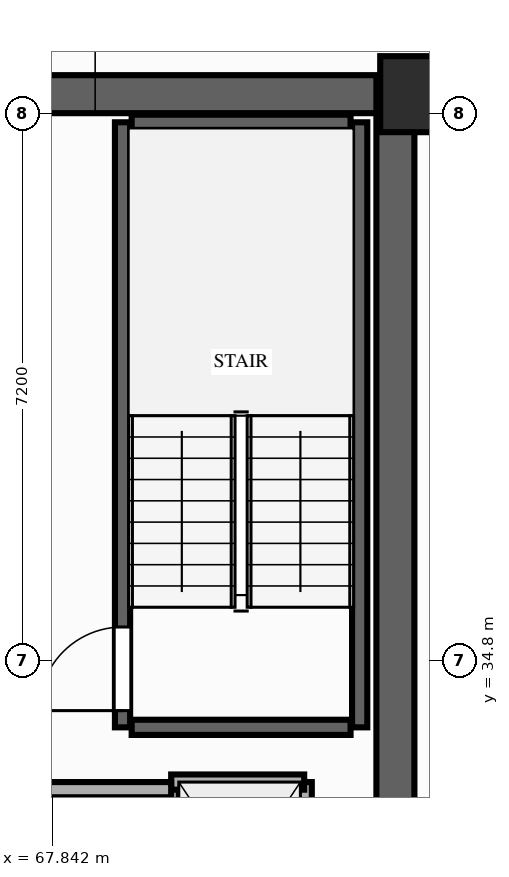
"""IFC4 building model, lengths in metres.
Left out: names, types, materials, properties, quantities, classifications, styles, units other than length and angle.
Written with IfcOpenShell. Run it as: python <this file> out.ifc"""

import sys

from ifc_helpers import new_model, si_unit, direction, frame, frame_2d, origin, origin_2d, place, context, subcontext, project, spatial, rectangle, extrude, element, fill, save


model = new_model("IFC4")
c1 = context("Model", 3, precision=1e-05, world=origin(), true_north=direction((0.0, 1.0)))
c2 = subcontext(c1, "Body", "Model", "MODEL_VIEW")
j1 = project(units=[si_unit("LENGTHUNIT", "METRE"), si_unit("PLANEANGLEUNIT", "RADIAN")], contexts=[c1])
p1 = place(None, origin())
s1 = spatial("IfcSite", under=j1, at=p1, CompositionType="ELEMENT")
p2 = place(p1, origin())
s2 = spatial("IfcBuilding", under=s1, at=p2, CompositionType="ELEMENT")
p3 = place(p2, frame((0.0, 0.0, 33.4)))
s3 = spatial("IfcBuildingStorey", under=s2, at=p3, CompositionType="ELEMENT", Elevation=33.4)
p4 = place(p3, frame((72.65, 42.25, 0.0), z_axis=(0.0, 0.0, 1.0), x_axis=(1.0, 0.0, 0.0)))
e1 = element("IfcColumn", 1, at=p4, inside=s3, PredefinedType="COLUMN", context=c2, shape_type="SweptSolid", body=[
    extrude(rectangle(XDim=1.0, YDim=1.0, at=origin_2d()), origin(), (0.0, 0.0, 1.0), 3.2),
])
p5 = place(p3, frame((72.35, 22.0, 0.0), z_axis=(0.0, 0.0, 1.0), x_axis=(0.0, 1.0, 0.0)))
e2 = element("IfcWall", 2, at=p5, inside=s3, PredefinedType="SHEAR", context=c2, shape_type="SweptSolid", body=[
    extrude(rectangle(XDim=20.25, YDim=0.5, at=frame_2d((10.125, 0.0))), origin(), (0.0, 0.0, 1.0), 3.02),
])
p6 = place(p3, frame((64.6, 42.25, 0.0), z_axis=(0.0, 0.0, 1.0), x_axis=(1.0, 0.0, 0.0)))
e3 = element("IfcWall", 3, at=p6, inside=s3, PredefinedType="SHEAR", context=c2, shape_type="SweptSolid", body=[
    extrude(rectangle(XDim=7.5, YDim=0.5, at=frame_2d((3.75, 0.0))), origin(), (0.0, 0.0, 1.0), 3.02),
])
p7 = place(p3, frame((68.76, 33.92, 0.0), z_axis=(0.0, 0.0, 1.0), x_axis=(0.0, 1.0, 0.0)))
e4 = element("IfcWall", 4, at=p7, inside=s3, PredefinedType="SHEAR", context=c2, shape_type="SweptSolid", body=[
    extrude(rectangle(XDim=7.96, YDim=0.2, at=frame_2d((3.98, 0.0))), origin(), (0.0, 0.0, 1.0), 3.02),
])
p8 = place(p7, frame((0.22, 0.0, 0.0)))
e5 = element("IfcOpeningElement", 5, at=p8, cuts=e4, PredefinedType="OPENING", context=c2, shape_type="SweptSolid", body=[
    extrude(rectangle(XDim=1.1, YDim=2.15, at=frame_2d((0.55, 1.075))), frame((0.0, 0.11, 0.0), z_axis=(0.0, -1.0, 0.0), x_axis=(1.0, 0.0, 0.0)), (0.0, 0.0, 1.0), 0.22),
])
p9 = place(p3, frame((71.88, 33.92, 0.0), z_axis=(0.0, 0.0, 1.0), x_axis=(0.0, 1.0, 0.0)))
e6 = element("IfcWall", 6, at=p9, inside=s3, PredefinedType="SHEAR", context=c2, shape_type="SweptSolid", body=[
    extrude(rectangle(XDim=7.96, YDim=0.2, at=frame_2d((3.98, 0.0))), origin(), (0.0, 0.0, 1.0), 3.02),
])
for number, where, z_axis, x_axis in (
    (7, (68.88, 41.88, 0.0), (0.0, 0.0, 1.0), (1.0, 0.0, 0.0)),
    (8, (68.88, 33.92, 0.0), (0.0, 0.0, 1.0), (1.0, 0.0, 0.0)),
):
    element("IfcWall", number, at=place(p3, frame(where, z_axis=z_axis, x_axis=x_axis)), inside=s3, PredefinedType="SHEAR", context=c2, shape_type="SweptSolid", body=[
        extrude(rectangle(XDim=2.88, YDim=0.2, at=frame_2d((1.44, 0.0))), origin(), (0.0, 0.0, 1.0), 3.02),
    ])
p10 = place(p3, frame((69.4, 30.75, 0.0), z_axis=(0.0, 0.0, 1.0), x_axis=(0.0, 1.0, 0.0)))
e9 = element("IfcWall", 9, at=p10, inside=s3, PredefinedType="MOVABLE", context=c2, shape_type="SweptSolid", body=[
    extrude(rectangle(XDim=2.45, YDim=0.2, at=frame_2d((1.225, 0.0))), origin(), (0.0, 0.0, 1.0), 3.02),
])
p11 = place(p10, frame((0.65, 0.0, 0.0)))
e10 = element("IfcOpeningElement", 10, at=p11, cuts=e9, PredefinedType="OPENING", context=c2, shape_type="SweptSolid", body=[
    extrude(rectangle(XDim=1.05, YDim=2.15, at=frame_2d((0.525, 1.075))), frame((0.0, 0.11, 0.0), z_axis=(0.0, -1.0, 0.0), x_axis=(1.0, 0.0, 0.0)), (0.0, 0.0, 1.0), 0.22),
])
p12 = place(p3, frame((71.15, 30.75, 0.0), z_axis=(0.0, 0.0, 1.0), x_axis=(0.0, 1.0, 0.0)))
e11 = element("IfcWall", 11, at=p12, inside=s3, PredefinedType="MOVABLE", context=c2, shape_type="SweptSolid", body=[
    extrude(rectangle(XDim=2.45, YDim=0.2, at=frame_2d((1.225, 0.0))), origin(), (0.0, 0.0, 1.0), 3.02),
])
p13 = place(p3, frame((69.4, 33.2, 0.0), z_axis=(0.0, 0.0, 1.0), x_axis=(1.0, 0.0, 0.0)))
e12 = element("IfcWall", 12, at=p13, inside=s3, PredefinedType="MOVABLE", context=c2, shape_type="SweptSolid", body=[
    extrude(rectangle(XDim=1.75, YDim=0.2, at=frame_2d((0.875, 0.0))), origin(), (0.0, 0.0, 1.0), 3.02),
])
p14 = place(p3, frame((65.8, 33.1, 0.0), z_axis=(0.0, 0.0, 1.0), x_axis=(1.0, 0.0, 0.0)))
e13 = element("IfcWall", 13, at=p14, inside=s3, PredefinedType="PARTITIONING", context=c2, shape_type="SweptSolid", body=[
    extrude(rectangle(XDim=3.6, YDim=0.2, at=frame_2d((1.8, 0.0))), origin(), (0.0, 0.0, 1.0), 3.02),
])
p15 = place(p8, origin())
e14 = element("IfcDoor", 14, at=p15, inside=s3, OperationType="SINGLE_SWING_LEFT", PredefinedType="DOOR", context=c2, shape_type="SweptSolid", body=[
    extrude(rectangle(XDim=1.1, YDim=2.15, at=frame_2d((0.55, 1.075))), frame((0.0, 0.025, 0.0), z_axis=(0.0, -1.0, 0.0), x_axis=(1.0, 0.0, 0.0)), (0.0, 0.0, 1.0), 0.05),
])
fill(e5, e14)
save(model, sys.argv[1])
